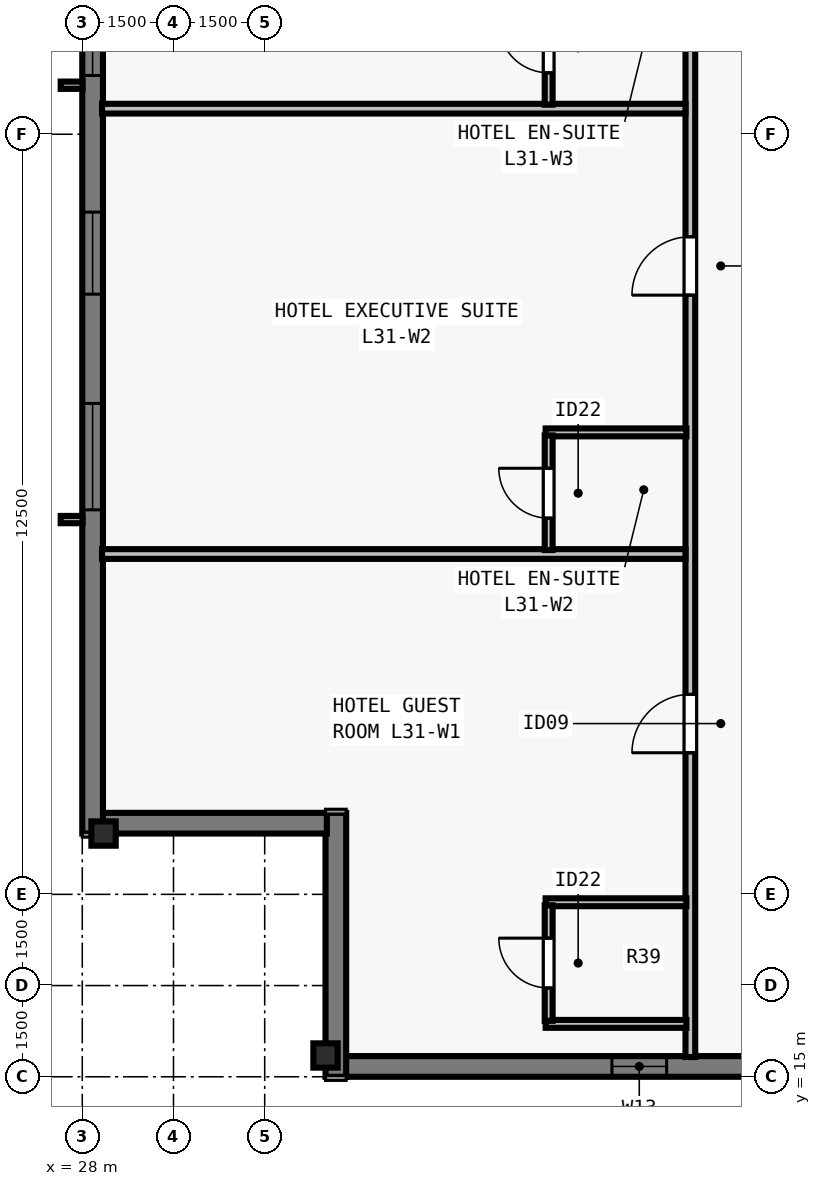
"""IFC4 building model, lengths in metres.
Left out: names, types, materials, properties, quantities, classifications, styles, units other than length and angle.
Written with IfcOpenShell. Run it as: python <this file> out.ifc"""

import sys

from ifc_helpers import new_model, si_unit, direction, frame, frame_2d, origin, origin_2d, place, context, subcontext, project, spatial, rectangle, i_section, extrude, element, fill, save


model = new_model("IFC4")
c1 = context("Model", 3, precision=1e-05, world=origin(), true_north=direction((0.0, 1.0)))
c2 = subcontext(c1, "Body", "Model", "MODEL_VIEW")
j1 = project(units=[si_unit("LENGTHUNIT", "METRE"), si_unit("PLANEANGLEUNIT", "RADIAN")], contexts=[c1])
p1 = place(None, origin())
s1 = spatial("IfcSite", under=j1, at=p1, CompositionType="ELEMENT")
p2 = place(p1, origin())
s2 = spatial("IfcBuilding", under=s1, at=p2, CompositionType="ELEMENT")
p3 = place(p2, frame((0.0, 0.0, 116.5)))
s3 = spatial("IfcBuildingStorey", under=s2, at=p3, CompositionType="ELEMENT", Elevation=116.5)
for number, where, z_axis, x_axis in (
    (1, (32.0, 15.35, 0.0), (0.0, 0.0, 1.0), (1.0, 0.0, 0.0)),
    (2, (28.35, 19.0, 0.0), (0.0, 0.0, 1.0), (0.0, 1.0, 0.0)),
):
    element("IfcColumn", number, at=place(p3, frame(where, z_axis=z_axis, x_axis=x_axis)), inside=s3, PredefinedType="COLUMN", context=c2, shape_type="SweptSolid", body=[
        extrude(i_section(OverallWidth=0.4, OverallDepth=0.4, WebThickness=0.022, FlangeThickness=0.036, at=origin_2d()), origin(), (0.0, 0.0, 1.0), 3.5),
    ])
p4 = place(p3, frame((72.0, 15.17, 0.0), z_axis=(0.0, 0.0, 1.0), x_axis=(-1.0, 0.0, 0.0)))
e3 = element("IfcWall", 3, at=p4, inside=s3, PredefinedType="SOLIDWALL", context=c2, shape_type="SweptSolid", body=[
    extrude(rectangle(XDim=39.682, YDim=0.34, at=frame_2d((19.841, 0.0))), origin(), (0.0, 0.0, 1.0), 3.28),
])
p5 = place(p4, frame((11.859, 0.0, 0.8)))
e4 = element("IfcOpeningElement", 4, at=p5, cuts=e3, PredefinedType="OPENING", context=c2, shape_type="SweptSolid", body=[
    extrude(rectangle(XDim=1.75, YDim=1.66, at=frame_2d((0.875, 0.83))), frame((0.0, 0.18, 0.0), z_axis=(0.0, -1.0, 0.0), x_axis=(1.0, 0.0, 0.0)), (0.0, 0.0, 1.0), 0.36),
])
p6 = place(p4, frame((16.062, 0.0, 0.8)))
e5 = element("IfcOpeningElement", 5, at=p6, cuts=e3, PredefinedType="OPENING", context=c2, shape_type="SweptSolid", body=[
    extrude(rectangle(XDim=1.35, YDim=1.66, at=frame_2d((0.675, 0.83))), frame((0.0, 0.18, 0.0), z_axis=(0.0, -1.0, 0.0), x_axis=(1.0, 0.0, 0.0)), (0.0, 0.0, 1.0), 0.36),
])
p7 = place(p4, frame((18.966, 0.0, 0.8)))
e6 = element("IfcOpeningElement", 6, at=p7, cuts=e3, PredefinedType="OPENING", context=c2, shape_type="SweptSolid", body=[
    extrude(rectangle(XDim=1.75, YDim=1.66, at=frame_2d((0.875, 0.83))), frame((0.0, 0.18, 0.0), z_axis=(0.0, -1.0, 0.0), x_axis=(1.0, 0.0, 0.0)), (0.0, 0.0, 1.0), 0.36),
])
p8 = place(p4, frame((21.469, 0.0, 0.8)))
e7 = element("IfcOpeningElement", 7, at=p8, cuts=e3, PredefinedType="OPENING", context=c2, shape_type="SweptSolid", body=[
    extrude(rectangle(XDim=1.35, YDim=1.66, at=frame_2d((0.675, 0.83))), frame((0.0, 0.18, 0.0), z_axis=(0.0, -1.0, 0.0), x_axis=(1.0, 0.0, 0.0)), (0.0, 0.0, 1.0), 0.36),
])
p9 = place(p4, frame((27.323, 0.0, 0.8)))
e8 = element("IfcOpeningElement", 8, at=p9, cuts=e3, PredefinedType="OPENING", context=c2, shape_type="SweptSolid", body=[
    extrude(rectangle(XDim=1.75, YDim=1.66, at=frame_2d((0.875, 0.83))), frame((0.0, 0.18, 0.0), z_axis=(0.0, -1.0, 0.0), x_axis=(1.0, 0.0, 0.0)), (0.0, 0.0, 1.0), 0.36),
])
p10 = place(p4, frame((29.827, 0.0, 0.8)))
e9 = element("IfcOpeningElement", 9, at=p10, cuts=e3, PredefinedType="OPENING", context=c2, shape_type="SweptSolid", body=[
    extrude(rectangle(XDim=1.35, YDim=1.66, at=frame_2d((0.675, 0.83))), frame((0.0, 0.18, 0.0), z_axis=(0.0, -1.0, 0.0), x_axis=(1.0, 0.0, 0.0)), (0.0, 0.0, 1.0), 0.36),
])
p11 = place(p4, frame((25.43, 0.0, 0.8)))
e10 = element("IfcOpeningElement", 10, at=p11, cuts=e3, PredefinedType="OPENING", context=c2, shape_type="SweptSolid", body=[
    extrude(rectangle(XDim=0.9, YDim=1.66, at=frame_2d((0.45, 0.83))), frame((0.0, 0.18, 0.0), z_axis=(0.0, -1.0, 0.0), x_axis=(1.0, 0.0, 0.0)), (0.0, 0.0, 1.0), 0.36),
])
p12 = place(p4, frame((34.39, 0.0, 0.8)))
e11 = element("IfcOpeningElement", 11, at=p12, cuts=e3, PredefinedType="OPENING", context=c2, shape_type="SweptSolid", body=[
    extrude(rectangle(XDim=0.9, YDim=1.66, at=frame_2d((0.45, 0.83))), frame((0.0, 0.18, 0.0), z_axis=(0.0, -1.0, 0.0), x_axis=(1.0, 0.0, 0.0)), (0.0, 0.0, 1.0), 0.36),
])
p13 = place(p3, frame((32.17, 15.0, 0.0), z_axis=(0.0, 0.0, 1.0), x_axis=(0.0, 1.0, 0.0)))
e12 = element("IfcWall", 12, at=p13, inside=s3, PredefinedType="SOLIDWALL", context=c2, shape_type="SweptSolid", body=[
    extrude(rectangle(XDim=4.34, YDim=0.34, at=frame_2d((2.17, 0.0))), origin(), (0.0, 0.0, 1.0), 3.28),
])
p14 = place(p3, frame((32.022, 19.17, 0.0), z_axis=(0.0, 0.0, 1.0), x_axis=(-1.0, 0.0, 0.0)))
e13 = element("IfcWall", 13, at=p14, inside=s3, PredefinedType="SOLIDWALL", context=c2, shape_type="SweptSolid", body=[
    extrude(rectangle(XDim=3.704, YDim=0.34, at=frame_2d((1.852, 0.0))), origin(), (0.0, 0.0, 1.0), 3.28),
])
p15 = place(p3, frame((28.17, 19.0, 0.0), z_axis=(0.0, 0.0, 1.0), x_axis=(0.0, 1.0, 0.0)))
e14 = element("IfcWall", 14, at=p15, inside=s3, PredefinedType="SOLIDWALL", context=c2, shape_type="SweptSolid", body=[
    extrude(rectangle(XDim=26.682, YDim=0.34, at=frame_2d((13.341, 0.0))), origin(), (0.0, 0.0, 1.0), 3.28),
])
p16 = place(p15, frame((5.323, 0.0, 0.8)))
e15 = element("IfcOpeningElement", 15, at=p16, cuts=e14, PredefinedType="OPENING", context=c2, shape_type="SweptSolid", body=[
    extrude(rectangle(XDim=1.75, YDim=1.66, at=frame_2d((0.875, 0.83))), frame((0.0, 0.18, 0.0), z_axis=(0.0, -1.0, 0.0), x_axis=(1.0, 0.0, 0.0)), (0.0, 0.0, 1.0), 0.36),
])
p17 = place(p15, frame((8.87, 0.0, 0.8)))
e16 = element("IfcOpeningElement", 16, at=p17, cuts=e14, PredefinedType="OPENING", context=c2, shape_type="SweptSolid", body=[
    extrude(rectangle(XDim=1.35, YDim=1.66, at=frame_2d((0.675, 0.83))), frame((0.0, 0.18, 0.0), z_axis=(0.0, -1.0, 0.0), x_axis=(1.0, 0.0, 0.0)), (0.0, 0.0, 1.0), 0.36),
])
p18 = place(p15, frame((12.466, 0.0, 0.8)))
e17 = element("IfcOpeningElement", 17, at=p18, cuts=e14, PredefinedType="OPENING", context=c2, shape_type="SweptSolid", body=[
    extrude(rectangle(XDim=1.75, YDim=1.66, at=frame_2d((0.875, 0.83))), frame((0.0, 0.18, 0.0), z_axis=(0.0, -1.0, 0.0), x_axis=(1.0, 0.0, 0.0)), (0.0, 0.0, 1.0), 0.36),
])
p19 = place(p15, frame((16.462, 0.0, 0.8)))
e18 = element("IfcOpeningElement", 18, at=p19, cuts=e14, PredefinedType="OPENING", context=c2, shape_type="SweptSolid", body=[
    extrude(rectangle(XDim=1.35, YDim=1.66, at=frame_2d((0.675, 0.83))), frame((0.0, 0.18, 0.0), z_axis=(0.0, -1.0, 0.0), x_axis=(1.0, 0.0, 0.0)), (0.0, 0.0, 1.0), 0.36),
])
p20 = place(p15, frame((20.909, 0.0, 0.8)))
e19 = element("IfcOpeningElement", 19, at=p20, cuts=e14, PredefinedType="OPENING", context=c2, shape_type="SweptSolid", body=[
    extrude(rectangle(XDim=1.75, YDim=1.66, at=frame_2d((0.875, 0.83))), frame((0.0, 0.18, 0.0), z_axis=(0.0, -1.0, 0.0), x_axis=(1.0, 0.0, 0.0)), (0.0, 0.0, 1.0), 0.36),
])
p21 = place(p3, frame((38.0, 15.325, 0.0), z_axis=(0.0, 0.0, 1.0), x_axis=(0.0, 1.0, 0.0)))
e20 = element("IfcWall", 20, at=p21, inside=s3, PredefinedType="PARTITIONING", context=c2, shape_type="SweptSolid", body=[
    extrude(rectangle(XDim=47.35, YDim=0.16, at=frame_2d((23.675, 0.0))), origin(), (0.0, 0.0, 1.0), 2.555),
])
p22 = place(p21, frame((5.003, 0.0, 0.0)))
e21 = element("IfcOpeningElement", 21, at=p22, cuts=e20, PredefinedType="OPENING", context=c2, shape_type="SweptSolid", body=[
    extrude(rectangle(XDim=0.96, YDim=2.15, at=frame_2d((0.48, 1.075))), frame((0.0, 0.09, 0.0), z_axis=(0.0, -1.0, 0.0), x_axis=(1.0, 0.0, 0.0)), (0.0, 0.0, 1.0), 0.18),
])
p23 = place(p21, frame((12.529, 0.0, 0.0)))
e22 = element("IfcOpeningElement", 22, at=p23, cuts=e20, PredefinedType="OPENING", context=c2, shape_type="SweptSolid", body=[
    extrude(rectangle(XDim=0.96, YDim=2.15, at=frame_2d((0.48, 1.075))), frame((0.0, 0.09, 0.0), z_axis=(0.0, -1.0, 0.0), x_axis=(1.0, 0.0, 0.0)), (0.0, 0.0, 1.0), 0.18),
])
p24 = place(p21, frame((20.389, 0.0, 0.0)))
e23 = element("IfcOpeningElement", 23, at=p24, cuts=e20, PredefinedType="OPENING", context=c2, shape_type="SweptSolid", body=[
    extrude(rectangle(XDim=0.96, YDim=2.15, at=frame_2d((0.48, 1.075))), frame((0.0, 0.09, 0.0), z_axis=(0.0, -1.0, 0.0), x_axis=(1.0, 0.0, 0.0)), (0.0, 0.0, 1.0), 0.18),
])
p25 = place(p21, frame((28.249, 0.0, 0.0)))
e24 = element("IfcOpeningElement", 24, at=p25, cuts=e20, PredefinedType="OPENING", context=c2, shape_type="SweptSolid", body=[
    extrude(rectangle(XDim=0.96, YDim=2.15, at=frame_2d((0.48, 1.075))), frame((0.0, 0.09, 0.0), z_axis=(0.0, -1.0, 0.0), x_axis=(1.0, 0.0, 0.0)), (0.0, 0.0, 1.0), 0.18),
])
p26 = place(p21, frame((36.109, 0.0, 0.0)))
e25 = element("IfcOpeningElement", 25, at=p26, cuts=e20, PredefinedType="OPENING", context=c2, shape_type="SweptSolid", body=[
    extrude(rectangle(XDim=0.96, YDim=2.15, at=frame_2d((0.48, 1.075))), frame((0.0, 0.09, 0.0), z_axis=(0.0, -1.0, 0.0), x_axis=(1.0, 0.0, 0.0)), (0.0, 0.0, 1.0), 0.18),
])
p27 = place(p21, frame((44.079, 0.0, 0.0)))
e26 = element("IfcOpeningElement", 26, at=p27, cuts=e20, PredefinedType="OPENING", context=c2, shape_type="SweptSolid", body=[
    extrude(rectangle(XDim=0.96, YDim=2.15, at=frame_2d((0.48, 1.075))), frame((0.0, 0.09, 0.0), z_axis=(0.0, -1.0, 0.0), x_axis=(1.0, 0.0, 0.0)), (0.0, 0.0, 1.0), 0.18),
])
for number, where, z_axis, x_axis in (
    (27, (35.62, 15.87, 0.0), (0.0, 0.0, 1.0), (1.0, 0.0, 0.0)),
    (28, (35.62, 17.87, 0.0), (0.0, 0.0, 1.0), (1.0, 0.0, 0.0)),
):
    element("IfcWall", number, at=place(p3, frame(where, z_axis=z_axis, x_axis=x_axis)), inside=s3, PredefinedType="PLUMBINGWALL", context=c2, shape_type="SweptSolid", body=[
        extrude(rectangle(XDim=2.315, YDim=0.13, at=frame_2d((1.157, 0.0))), origin(), (0.0, 0.0, 1.0), 3.28),
    ])
p28 = place(p3, frame((35.67, 15.92, 0.0), z_axis=(0.0, 0.0, 1.0), x_axis=(0.0, 1.0, 0.0)))
e29 = element("IfcWall", 29, at=p28, inside=s3, PredefinedType="PLUMBINGWALL", context=c2, shape_type="SweptSolid", body=[
    extrude(rectangle(XDim=1.9, YDim=0.13, at=frame_2d((0.95, 0.0))), origin(), (0.0, 0.0, 1.0), 3.28),
])
p29 = place(p28, frame((0.54, 0.0, 0.0)))
e30 = element("IfcOpeningElement", 30, at=p29, cuts=e29, PredefinedType="OPENING", context=c2, shape_type="SweptSolid", body=[
    extrude(rectangle(XDim=0.82, YDim=2.1, at=frame_2d((0.41, 1.05))), frame((0.0, 0.075, 0.0), z_axis=(0.0, -1.0, 0.0), x_axis=(1.0, 0.0, 0.0)), (0.0, 0.0, 1.0), 0.15),
])
p30 = place(p3, frame((28.325, 23.597, 0.0), z_axis=(0.0, 0.0, 1.0), x_axis=(1.0, 0.0, 0.0)))
e31 = element("IfcWall", 31, at=p30, inside=s3, PredefinedType="PARTITIONING", context=c2, shape_type="SweptSolid", body=[
    extrude(rectangle(XDim=9.595, YDim=0.16, at=frame_2d((4.797, 0.0))), origin(), (0.0, 0.0, 1.0), 2.896),
])
p31 = place(p3, frame((35.62, 25.597, 0.0), z_axis=(0.0, 0.0, 1.0), x_axis=(1.0, 0.0, 0.0)))
e32 = element("IfcWall", 32, at=p31, inside=s3, PredefinedType="PLUMBINGWALL", context=c2, shape_type="SweptSolid", body=[
    extrude(rectangle(XDim=2.315, YDim=0.13, at=frame_2d((1.157, 0.0))), origin(), (0.0, 0.0, 1.0), 2.896),
])
p32 = place(p3, frame((35.67, 23.662, 0.0), z_axis=(0.0, 0.0, 1.0), x_axis=(0.0, 1.0, 0.0)))
e33 = element("IfcWall", 33, at=p32, inside=s3, PredefinedType="PLUMBINGWALL", context=c2, shape_type="SweptSolid", body=[
    extrude(rectangle(XDim=1.885, YDim=0.13, at=frame_2d((0.942, 0.0))), origin(), (0.0, 0.0, 1.0), 3.28),
])
p33 = place(p32, frame((0.525, 0.0, 0.0)))
e34 = element("IfcOpeningElement", 34, at=p33, cuts=e33, PredefinedType="OPENING", context=c2, shape_type="SweptSolid", body=[
    extrude(rectangle(XDim=0.82, YDim=2.1, at=frame_2d((0.41, 1.05))), frame((0.0, 0.075, 0.0), z_axis=(0.0, -1.0, 0.0), x_axis=(1.0, 0.0, 0.0)), (0.0, 0.0, 1.0), 0.15),
])
p34 = place(p3, frame((28.325, 30.921, 0.0), z_axis=(0.0, 0.0, 1.0), x_axis=(1.0, 0.0, 0.0)))
e35 = element("IfcWall", 35, at=p34, inside=s3, PredefinedType="PARTITIONING", context=c2, shape_type="SweptSolid", body=[
    extrude(rectangle(XDim=9.595, YDim=0.16, at=frame_2d((4.797, 0.0))), origin(), (0.0, 0.0, 1.0), 3.28),
])
p35 = place(p3, frame((35.67, 30.986, 0.0), z_axis=(0.0, 0.0, 1.0), x_axis=(0.0, 1.0, 0.0)))
e36 = element("IfcWall", 36, at=p35, inside=s3, PredefinedType="PLUMBINGWALL", context=c2, shape_type="SweptSolid", body=[
    extrude(rectangle(XDim=1.885, YDim=0.13, at=frame_2d((0.942, 0.0))), origin(), (0.0, 0.0, 1.0), 3.28),
])
p36 = place(p35, frame((0.525, 0.0, 0.0)))
e37 = element("IfcOpeningElement", 37, at=p36, cuts=e36, PredefinedType="OPENING", context=c2, shape_type="SweptSolid", body=[
    extrude(rectangle(XDim=0.82, YDim=2.1, at=frame_2d((0.41, 1.05))), frame((0.0, 0.075, 0.0), z_axis=(0.0, -1.0, 0.0), x_axis=(1.0, 0.0, 0.0)), (0.0, 0.0, 1.0), 0.15),
])
p37 = place(p16, origin())
e38 = element("IfcWindow", 38, at=p37, inside=s3, PartitioningType="SINGLE_PANEL", PredefinedType="WINDOW", context=c2, shape_type="SweptSolid", body=[
    extrude(rectangle(XDim=1.75, YDim=1.66, at=frame_2d((0.875, 0.83))), frame((0.0, -0.05, 0.0), z_axis=(0.0, -1.0, 0.0), x_axis=(1.0, 0.0, 0.0)), (0.0, 0.0, 1.0), 0.06),
])
fill(e15, e38)
p38 = place(p17, origin())
e39 = element("IfcWindow", 39, at=p38, inside=s3, PartitioningType="SINGLE_PANEL", PredefinedType="WINDOW", context=c2, shape_type="SweptSolid", body=[
    extrude(rectangle(XDim=1.35, YDim=1.66, at=frame_2d((0.675, 0.83))), frame((0.0, -0.05, 0.0), z_axis=(0.0, -1.0, 0.0), x_axis=(1.0, 0.0, 0.0)), (0.0, 0.0, 1.0), 0.06),
])
fill(e16, e39)
p39 = place(p18, origin())
e40 = element("IfcWindow", 40, at=p39, inside=s3, PartitioningType="SINGLE_PANEL", PredefinedType="WINDOW", context=c2, shape_type="SweptSolid", body=[
    extrude(rectangle(XDim=1.75, YDim=1.66, at=frame_2d((0.875, 0.83))), frame((0.0, -0.05, 0.0), z_axis=(0.0, -1.0, 0.0), x_axis=(1.0, 0.0, 0.0)), (0.0, 0.0, 1.0), 0.06),
])
fill(e17, e40)
p40 = place(p12, origin())
e41 = element("IfcWindow", 41, at=p40, inside=s3, PartitioningType="SINGLE_PANEL", PredefinedType="WINDOW", context=c2, shape_type="SweptSolid", body=[
    extrude(rectangle(XDim=0.9, YDim=1.66, at=frame_2d((0.45, 0.83))), frame((0.0, -0.04, 0.0), z_axis=(0.0, -1.0, 0.0), x_axis=(1.0, 0.0, 0.0)), (0.0, 0.0, 1.0), 0.06),
])
fill(e11, e41)
p41 = place(p29, origin())
e42 = element("IfcDoor", 42, at=p41, inside=s3, OperationType="SINGLE_SWING_RIGHT", PredefinedType="DOOR", context=c2, shape_type="SweptSolid", body=[
    extrude(rectangle(XDim=0.82, YDim=2.1, at=frame_2d((0.41, 1.05))), frame((0.0, 0.025, 0.0), z_axis=(0.0, -1.0, 0.0), x_axis=(1.0, 0.0, 0.0)), (0.0, 0.0, 1.0), 0.05),
])
fill(e30, e42)
p42 = place(p22, origin())
e43 = element("IfcDoor", 43, at=p42, inside=s3, OperationType="SINGLE_SWING_LEFT", PredefinedType="DOOR", context=c2, shape_type="SweptSolid", body=[
    extrude(rectangle(XDim=0.96, YDim=2.15, at=frame_2d((0.48, 1.075))), frame((0.0, 0.025, 0.0), z_axis=(0.0, -1.0, 0.0), x_axis=(1.0, 0.0, 0.0)), (0.0, 0.0, 1.0), 0.05),
])
fill(e21, e43)
p43 = place(p33, origin())
e44 = element("IfcDoor", 44, at=p43, inside=s3, OperationType="SINGLE_SWING_RIGHT", PredefinedType="DOOR", context=c2, shape_type="SweptSolid", body=[
    extrude(rectangle(XDim=0.82, YDim=2.1, at=frame_2d((0.41, 1.05))), frame((0.0, 0.025, 0.0), z_axis=(0.0, -1.0, 0.0), x_axis=(1.0, 0.0, 0.0)), (0.0, 0.0, 1.0), 0.05),
])
fill(e34, e44)
p44 = place(p23, origin())
e45 = element("IfcDoor", 45, at=p44, inside=s3, OperationType="SINGLE_SWING_LEFT", PredefinedType="DOOR", context=c2, shape_type="SweptSolid", body=[
    extrude(rectangle(XDim=0.96, YDim=2.15, at=frame_2d((0.48, 1.075))), frame((0.0, 0.025, 0.0), z_axis=(0.0, -1.0, 0.0), x_axis=(1.0, 0.0, 0.0)), (0.0, 0.0, 1.0), 0.05),
])
fill(e22, e45)
p45 = place(p36, origin())
e46 = element("IfcDoor", 46, at=p45, inside=s3, OperationType="SINGLE_SWING_RIGHT", PredefinedType="DOOR", context=c2, shape_type="SweptSolid", body=[
    extrude(rectangle(XDim=0.82, YDim=2.1, at=frame_2d((0.41, 1.05))), frame((0.0, 0.025, 0.0), z_axis=(0.0, -1.0, 0.0), x_axis=(1.0, 0.0, 0.0)), (0.0, 0.0, 1.0), 0.05),
])
fill(e37, e46)
save(model, sys.argv[1])
